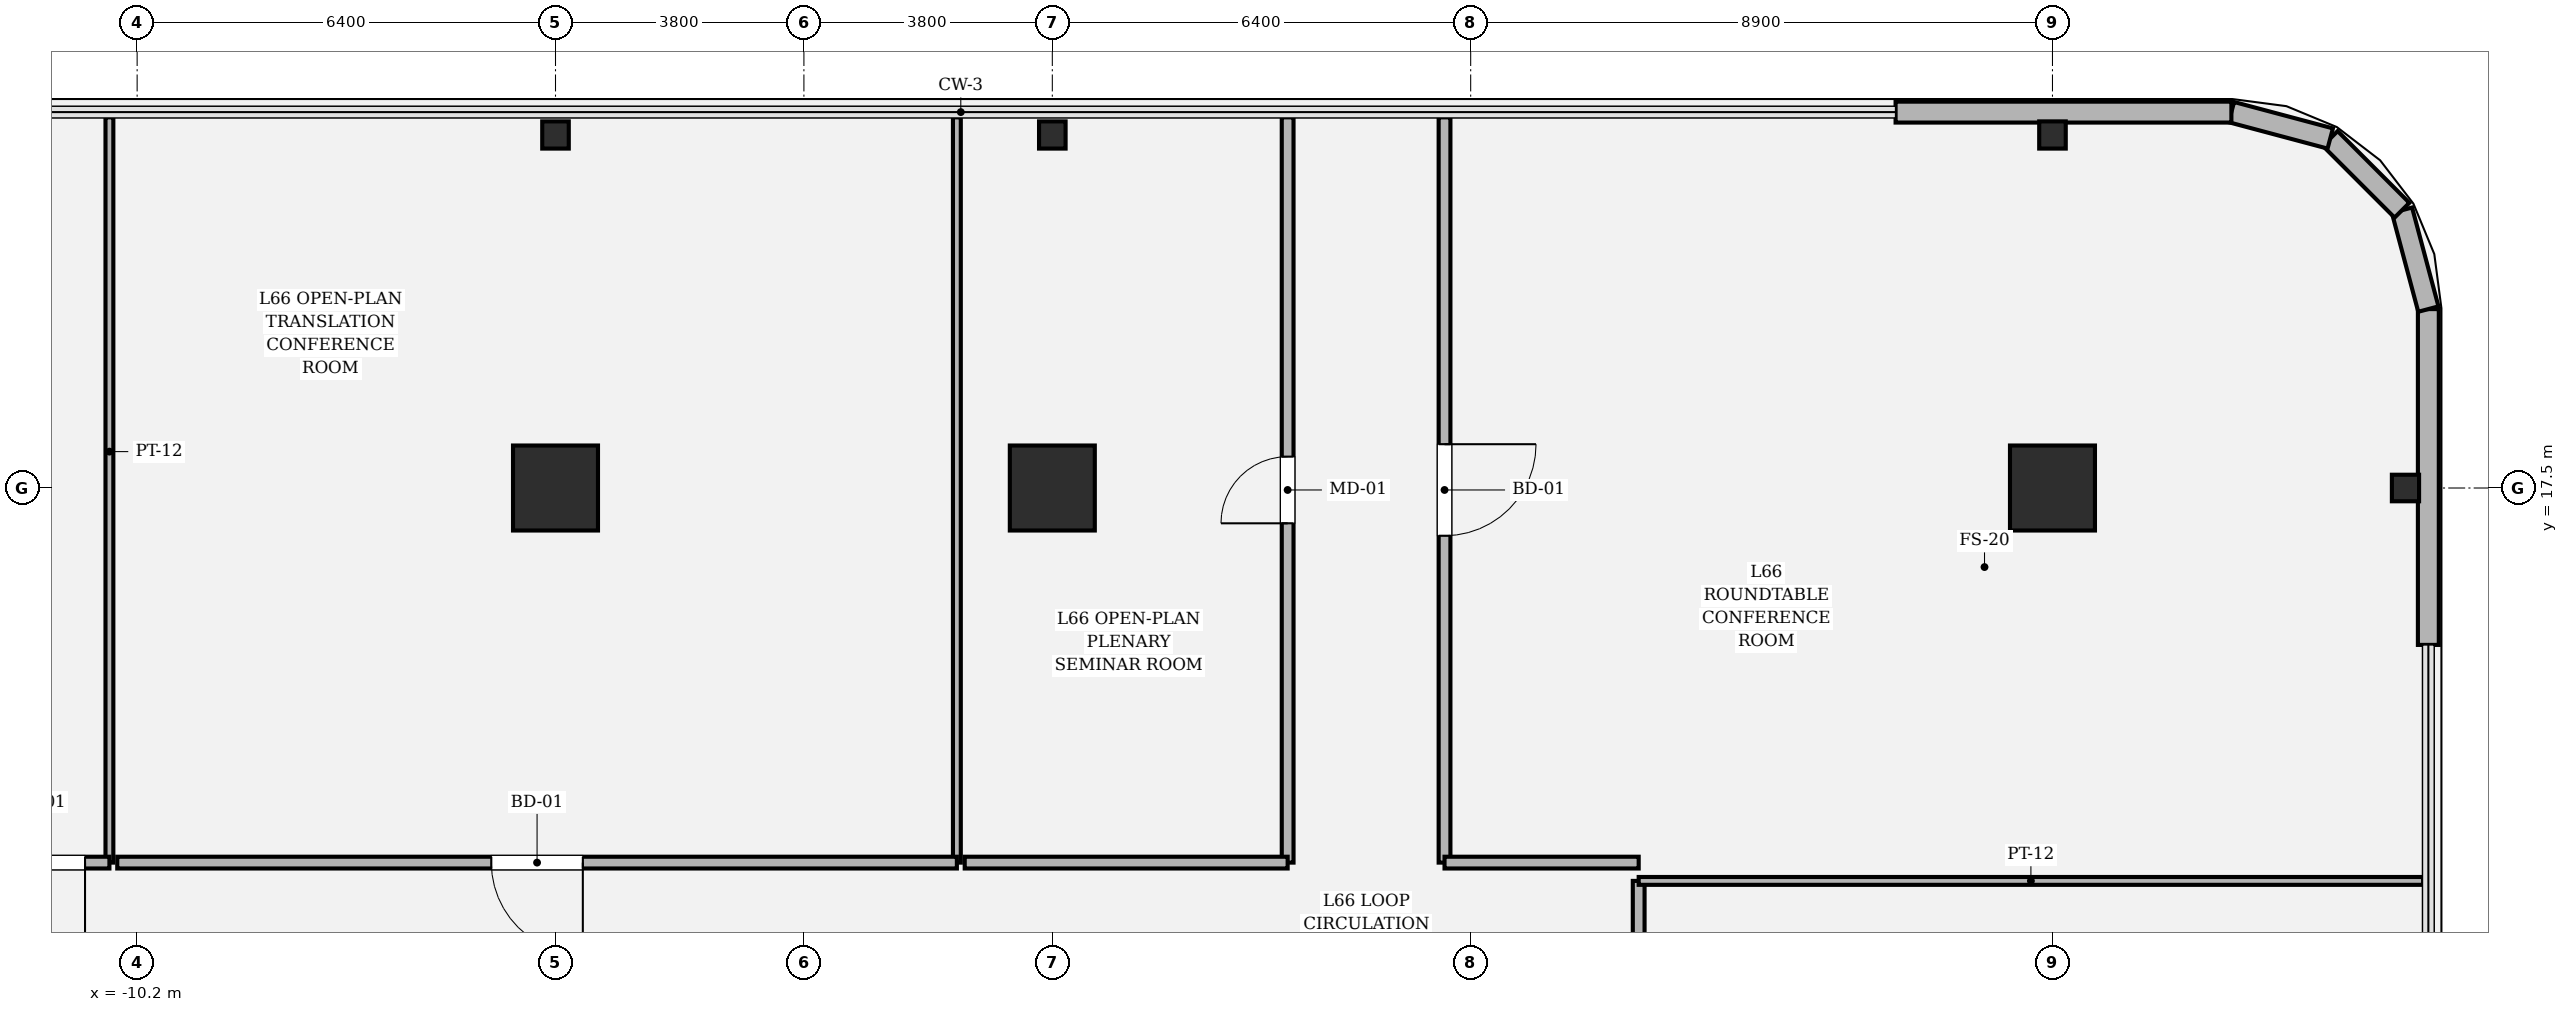
"""IFC4 building model, lengths in metres.
Left out: names, types, materials, properties, quantities, classifications, styles, units other than length and angle.
Written with IfcOpenShell. Run it as: python <this file> out.ifc"""

import sys

from ifc_helpers import new_model, si_unit, direction, frame, frame_2d, origin, origin_2d, place, context, subcontext, project, spatial, rectangle, hollow_rectangle, i_section, extrude, element, fill, save


model = new_model("IFC4")
c1 = context("Model", 3, precision=1e-05, world=origin(), true_north=direction((0.0, 1.0)))
c2 = subcontext(c1, "Body", "Model", "MODEL_VIEW")
j1 = project(units=[si_unit("LENGTHUNIT", "METRE"), si_unit("PLANEANGLEUNIT", "RADIAN")], contexts=[c1])
p1 = place(None, origin())
s1 = spatial("IfcSite", under=j1, at=p1, CompositionType="ELEMENT")
p2 = place(p1, origin())
s2 = spatial("IfcBuilding", under=s1, at=p2, CompositionType="ELEMENT")
p3 = place(p2, frame((0.0, 0.0, 279.75)))
s3 = spatial("IfcBuildingStorey", under=s2, at=p3, CompositionType="ELEMENT", Elevation=279.75)
for number, where, z_axis, x_axis in (
    (1, (19.1, 17.5, 0.0), (0.0, 0.0, 1.0), (1.0, 0.0, 0.0)),
    (2, (3.8, 17.5, 0.0), (0.0, 0.0, 1.0), (1.0, 0.0, 0.0)),
    (3, (-3.8, 17.5, 0.0), (0.0, 0.0, 1.0), (1.0, 0.0, 0.0)),
):
    element("IfcColumn", number, at=place(p3, frame(where, z_axis=z_axis, x_axis=x_axis)), inside=s3, PredefinedType="COLUMN", context=c2, shape_type="SweptSolid", body=[
        extrude(hollow_rectangle(XDim=1.3, YDim=1.3, WallThickness=0.038, at=origin_2d()), origin(), (0.0, 0.0, 1.0), 4.05),
    ])
for number, where, z_axis, x_axis in (
    (4, (-3.8, 22.9, 0.0), (0.0, 0.0, 1.0), (1.0, 0.0, 0.0)),
    (5, (3.8, 22.9, 0.0), (0.0, 0.0, 1.0), (1.0, 0.0, 0.0)),
    (6, (19.1, 22.9, 0.0), (0.0, 0.0, 1.0), (1.0, 0.0, 0.0)),
    (7, (24.5, 17.5, 0.0), (0.0, 0.0, 1.0), (0.0, 1.0, 0.0)),
):
    element("IfcColumn", number, at=place(p3, frame(where, z_axis=z_axis, x_axis=x_axis)), inside=s3, PredefinedType="COLUMN", context=c2, shape_type="SweptSolid", body=[
        extrude(i_section(OverallWidth=0.406, OverallDepth=0.416, WebThickness=0.029, FlangeThickness=0.048, FilletRadius=0.018, at=origin_2d()), origin(), (0.0, 0.0, 1.0), 4.048),
    ])
p4 = place(p3, frame((24.85, 15.1, 0.0), z_axis=(0.0, 0.0, 1.0), x_axis=(0.0, 1.0, 0.0)))
e8 = element("IfcWall", 8, at=p4, inside=s3, PredefinedType="SOLIDWALL", context=c2, shape_type="SweptSolid", body=[
    extrude(rectangle(XDim=5.137, YDim=0.32, at=frame_2d((2.568, 0.0))), origin(), (0.0, 0.0, 1.0), 3.77),
])
p5 = place(p3, frame((24.85, 20.237, 0.0), z_axis=(0.0, 0.0, 1.0), x_axis=(-0.257847112249, 0.966185730957, 0.0)))
e9 = element("IfcWall", 9, at=p5, inside=s3, PredefinedType="SOLIDWALL", context=c2, shape_type="SweptSolid", body=[
    extrude(rectangle(XDim=1.565, YDim=0.32, at=frame_2d((0.783, 0.0))), origin(), (0.0, 0.0, 1.0), 3.77),
])
p6 = place(p3, frame((24.447, 21.749, 0.0), z_axis=(0.0, 0.0, 1.0), x_axis=(-0.707028130747, 0.707185422879, 0.0)))
e10 = element("IfcWall", 10, at=p6, inside=s3, PredefinedType="SOLIDWALL", context=c2, shape_type="SweptSolid", body=[
    extrude(rectangle(XDim=1.552, YDim=0.32, at=frame_2d((0.776, 0.0))), origin(), (0.0, 0.0, 1.0), 3.77),
])
p7 = place(p3, frame((23.349, 22.847, 0.0), z_axis=(0.0, 0.0, 1.0), x_axis=(-0.966224582397, 0.257701486942, 0.0)))
e11 = element("IfcWall", 11, at=p7, inside=s3, PredefinedType="SOLIDWALL", context=c2, shape_type="SweptSolid", body=[
    extrude(rectangle(XDim=1.565, YDim=0.32, at=frame_2d((0.783, 0.0))), origin(), (0.0, 0.0, 1.0), 3.77),
])
p8 = place(p3, frame((21.837, 23.25, 0.0), z_axis=(0.0, 0.0, 1.0), x_axis=(-1.0, 0.0, 0.0)))
e12 = element("IfcWall", 12, at=p8, inside=s3, PredefinedType="SOLIDWALL", context=c2, shape_type="SweptSolid", body=[
    extrude(rectangle(XDim=5.137, YDim=0.32, at=frame_2d((2.568, 0.0))), origin(), (0.0, 0.0, 1.0), 2.444),
])
p9 = place(p3, frame((12.77, -3.174, 0.0), z_axis=(0.0, 0.0, 1.0), x_axis=(0.0, 1.0, 0.0)))
e13 = element("IfcWall", 13, at=p9, inside=s3, PredefinedType="PARTITIONING", context=c2, shape_type="SweptSolid", body=[
    extrude(rectangle(XDim=14.664, YDim=0.18, at=frame_2d((7.332, 0.0))), origin(), (0.0, 0.0, 1.0), 2.444),
])
p10 = place(p9, frame((6.807, 0.0, 0.0)))
e14 = element("IfcOpeningElement", 14, at=p10, cuts=e13, PredefinedType="OPENING", context=c2, shape_type="SweptSolid", body=[
    extrude(rectangle(XDim=1.05, YDim=2.2, at=frame_2d((0.525, 1.1))), frame((0.0, 0.1, 0.0), z_axis=(0.0, -1.0, 0.0), x_axis=(1.0, 0.0, 0.0)), (0.0, 0.0, 1.0), 0.2),
])
p11 = place(p3, frame((12.77, 11.49, 0.0), z_axis=(0.0, 0.0, 1.0), x_axis=(1.0, 0.0, 0.0)))
e15 = element("IfcWall", 15, at=p11, inside=s3, PredefinedType="PARTITIONING", context=c2, shape_type="SweptSolid", body=[
    extrude(rectangle(XDim=12.0, YDim=0.12, at=frame_2d((6.0, 0.0))), origin(), (0.0, 0.0, 1.0), 2.444),
])
p12 = place(p3, frame((-10.624, 23.17, 0.0), z_axis=(0.0, 0.0, 1.0), x_axis=(0.0, -1.0, 0.0)))
e16 = element("IfcWall", 16, at=p12, inside=s3, PredefinedType="PARTITIONING", context=c2, shape_type="SweptSolid", body=[
    extrude(rectangle(XDim=11.4, YDim=0.12, at=frame_2d((5.7, 0.0))), origin(), (0.0, 0.0, 1.0), 2.444),
])
p13 = place(p3, frame((-10.624, 11.77, 0.0), z_axis=(0.0, 0.0, 1.0), x_axis=(-1.0, 0.0, 0.0)))
e17 = element("IfcWall", 17, at=p13, inside=s3, PredefinedType="PARTITIONING", context=c2, shape_type="SweptSolid", body=[
    extrude(rectangle(XDim=2.146, YDim=0.18, at=frame_2d((1.073, 0.0))), origin(), (0.0, 0.0, 1.0), 3.77),
])
p14 = place(p13, frame((0.373, 0.0, 0.0)))
e18 = element("IfcOpeningElement", 18, at=p14, cuts=e17, PredefinedType="OPENING", context=c2, shape_type="SweptSolid", body=[
    extrude(rectangle(XDim=1.4, YDim=2.25, at=frame_2d((0.7, 1.125))), frame((0.0, 0.1, 0.0), z_axis=(0.0, -1.0, 0.0), x_axis=(1.0, 0.0, 0.0)), (0.0, 0.0, 1.0), 0.2),
])
p15 = place(p3, frame((9.8, 11.77, 0.0), z_axis=(0.0, 0.0, 1.0), x_axis=(0.0, 1.0, 0.0)))
e19 = element("IfcWall", 19, at=p15, inside=s3, PredefinedType="PARTITIONING", context=c2, shape_type="SweptSolid", body=[
    extrude(rectangle(XDim=11.4, YDim=0.18, at=frame_2d((5.7, 0.0))), origin(), (0.0, 0.0, 1.0), 2.444),
])
p16 = place(p15, frame((5.0, 0.0, 0.0)))
e20 = element("IfcOpeningElement", 20, at=p16, cuts=e19, PredefinedType="OPENING", context=c2, shape_type="SweptSolid", body=[
    extrude(rectangle(XDim=1.4, YDim=2.25, at=frame_2d((0.7, 1.125))), frame((0.0, 0.1, 0.0), z_axis=(0.0, -1.0, 0.0), x_axis=(1.0, 0.0, 0.0)), (0.0, 0.0, 1.0), 0.2),
])
p17 = place(p3, frame((12.77, 11.77, 0.0), z_axis=(0.0, 0.0, 1.0), x_axis=(-1.0, 0.0, 0.0)))
e21 = element("IfcWall", 21, at=p17, inside=s3, PredefinedType="PARTITIONING", context=c2, shape_type="SweptSolid", body=[
    extrude(rectangle(XDim=2.97, YDim=0.18, at=frame_2d((1.485, 0.0))), origin(), (0.0, 0.0, 1.0), 2.444),
])
p18 = place(p3, frame((2.34, 23.17, 0.0), z_axis=(0.0, 0.0, 1.0), x_axis=(0.0, -1.0, 0.0)))
e22 = element("IfcWall", 22, at=p18, inside=s3, PredefinedType="PARTITIONING", context=c2, shape_type="SweptSolid", body=[
    extrude(rectangle(XDim=11.4, YDim=0.12, at=frame_2d((5.7, 0.0))), origin(), (0.0, 0.0, 1.0), 2.444),
])
p19 = place(p3, frame((2.34, 11.77, 0.0), z_axis=(0.0, 0.0, 1.0), x_axis=(-1.0, 0.0, 0.0)))
e23 = element("IfcWall", 23, at=p19, inside=s3, PredefinedType="PARTITIONING", context=c2, shape_type="SweptSolid", body=[
    extrude(rectangle(XDim=12.844, YDim=0.18, at=frame_2d((6.422, 0.0))), origin(), (0.0, 0.0, 1.0), 2.444),
])
p20 = place(p19, frame((5.722, 0.0, 0.0)))
e24 = element("IfcOpeningElement", 24, at=p20, cuts=e23, PredefinedType="OPENING", context=c2, shape_type="SweptSolid", body=[
    extrude(rectangle(XDim=1.4, YDim=2.25, at=frame_2d((0.7, 1.125))), frame((0.0, 0.1, 0.0), z_axis=(0.0, -1.0, 0.0), x_axis=(1.0, 0.0, 0.0)), (0.0, 0.0, 1.0), 0.2),
])
p21 = place(p3, frame((7.4, 23.17, 0.0), z_axis=(0.0, 0.0, 1.0), x_axis=(0.0, -1.0, 0.0)))
e25 = element("IfcWall", 25, at=p21, inside=s3, PredefinedType="PARTITIONING", context=c2, shape_type="SweptSolid", body=[
    extrude(rectangle(XDim=11.4, YDim=0.18, at=frame_2d((5.7, 0.0))), origin(), (0.0, 0.0, 1.0), 2.444),
])
p22 = place(p21, frame((5.19, 0.0, 0.0)))
e26 = element("IfcOpeningElement", 26, at=p22, cuts=e25, PredefinedType="OPENING", context=c2, shape_type="SweptSolid", body=[
    extrude(rectangle(XDim=1.02, YDim=2.2, at=frame_2d((0.51, 1.1))), frame((0.0, 0.1, 0.0), z_axis=(0.0, -1.0, 0.0), x_axis=(1.0, 0.0, 0.0)), (0.0, 0.0, 1.0), 0.2),
])
p23 = place(p3, frame((7.4, 11.77, 0.0), z_axis=(0.0, 0.0, 1.0), x_axis=(-1.0, 0.0, 0.0)))
e27 = element("IfcWall", 27, at=p23, inside=s3, PredefinedType="PARTITIONING", context=c2, shape_type="SweptSolid", body=[
    extrude(rectangle(XDim=4.94, YDim=0.18, at=frame_2d((2.47, 0.0))), origin(), (0.0, 0.0, 1.0), 2.444),
])
p24 = place(p14, origin())
e28 = element("IfcDoor", 28, at=p24, inside=s3, OperationType="SINGLE_SWING_LEFT", PredefinedType="DOOR", context=c2, shape_type="SweptSolid", body=[
    extrude(rectangle(XDim=1.4, YDim=2.25, at=frame_2d((0.7, 1.125))), frame((0.0, 0.025, 0.0), z_axis=(0.0, -1.0, 0.0), x_axis=(1.0, 0.0, 0.0)), (0.0, 0.0, 1.0), 0.05),
])
fill(e18, e28)
p25 = place(p16, origin())
e29 = element("IfcDoor", 29, at=p25, inside=s3, OperationType="SINGLE_SWING_RIGHT", PredefinedType="DOOR", context=c2, shape_type="SweptSolid", body=[
    extrude(rectangle(XDim=1.4, YDim=2.25, at=frame_2d((0.7, 1.125))), frame((0.0, 0.025, 0.0), z_axis=(0.0, -1.0, 0.0), x_axis=(1.0, 0.0, 0.0)), (0.0, 0.0, 1.0), 0.05),
])
fill(e20, e29)
p26 = place(p20, origin())
e30 = element("IfcDoor", 30, at=p26, inside=s3, OperationType="SINGLE_SWING_LEFT", PredefinedType="DOOR", context=c2, shape_type="SweptSolid", body=[
    extrude(rectangle(XDim=1.4, YDim=2.25, at=frame_2d((0.7, 1.125))), frame((0.0, 0.025, 0.0), z_axis=(0.0, -1.0, 0.0), x_axis=(1.0, 0.0, 0.0)), (0.0, 0.0, 1.0), 0.05),
])
fill(e24, e30)
p27 = place(p22, origin())
e31 = element("IfcDoor", 31, at=p27, inside=s3, OperationType="SINGLE_SWING_RIGHT", PredefinedType="DOOR", context=c2, shape_type="SweptSolid", body=[
    extrude(rectangle(XDim=1.02, YDim=2.2, at=frame_2d((0.51, 1.1))), frame((0.0, 0.025, 0.0), z_axis=(0.0, -1.0, 0.0), x_axis=(1.0, 0.0, 0.0)), (0.0, 0.0, 1.0), 0.05),
])
fill(e26, e31)
save(model, sys.argv[1])
